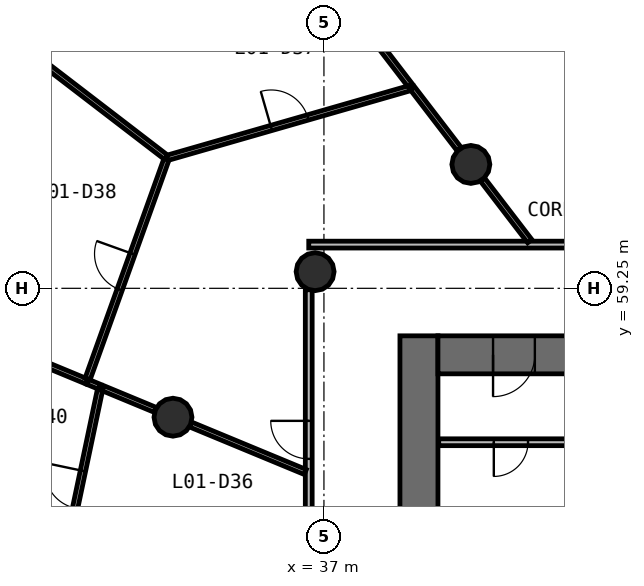
"""IFC4 building model, lengths in metres.
Left out: names, types, materials, properties, quantities, classifications, styles, units other than length and angle.
Written with IfcOpenShell. Run it as: python <this file> out.ifc"""

import sys

from ifc_helpers import new_model, si_unit, direction, frame, frame_2d, origin, origin_2d, place, context, subcontext, project, spatial, rectangle, circle, extrude, source, transform, mapped, element, fill, save


model = new_model("IFC4")
c1 = context("Model", 3, precision=1e-05, world=origin(), true_north=direction((0.0, 1.0)))
c2 = subcontext(c1, "Body", "Model", "MODEL_VIEW")
j1 = project(units=[si_unit("LENGTHUNIT", "METRE"), si_unit("PLANEANGLEUNIT", "RADIAN")], contexts=[c1])
p1 = place(None, origin())
s1 = spatial("IfcSite", under=j1, at=p1, CompositionType="ELEMENT")
p2 = place(p1, origin())
s2 = spatial("IfcBuilding", under=s1, at=p2, CompositionType="ELEMENT")
p3 = place(p2, frame((0.0, 0.0, 5.0)))
s3 = spatial("IfcBuildingStorey", under=s2, at=p3, CompositionType="ELEMENT", Elevation=5.0)
p4 = place(p3, frame((39.5, 58.0, 0.0), z_axis=(0.0, 0.0, 1.0), x_axis=(0.0, -1.0, 0.0)))
e1 = element("IfcWall", 1, at=p4, inside=s3, PredefinedType="SHEAR", context=c2, shape_type="SweptSolid", body=[
    extrude(rectangle(XDim=20.0, YDim=1.0, at=frame_2d((10.0, 0.0))), origin(), (0.0, 0.0, 1.0), 4.4),
])
p5 = place(p4, frame((9.1, 0.0, 0.0)))
e2 = element("IfcOpeningElement", 2, at=p5, cuts=e1, PredefinedType="OPENING", context=c2, shape_type="SweptSolid", body=[
    extrude(rectangle(XDim=1.8, YDim=2.1, at=frame_2d((0.9, 1.05))), frame((0.0, 0.51, 0.0), z_axis=(0.0, -1.0, 0.0), x_axis=(1.0, 0.0, 0.0)), (0.0, 0.0, 1.0), 1.02),
])
p6 = place(p3, frame((64.0, 57.5, 0.0), z_axis=(0.0, 0.0, 1.0), x_axis=(-1.0, 0.0, 0.0)))
e3 = element("IfcWall", 3, at=p6, inside=s3, PredefinedType="SHEAR", context=c2, shape_type="SweptSolid", body=[
    extrude(rectangle(XDim=24.0, YDim=1.0, at=frame_2d((12.0, 0.0))), origin(), (0.0, 0.0, 1.0), 4.4),
])
p7 = place(p6, frame((21.45, 0.0, 0.0)))
e4 = element("IfcOpeningElement", 4, at=p7, cuts=e3, PredefinedType="OPENING", context=c2, shape_type="SweptSolid", body=[
    extrude(rectangle(XDim=1.1, YDim=2.1, at=frame_2d((0.55, 1.05))), frame((0.0, 0.51, 0.0), z_axis=(0.0, -1.0, 0.0), x_axis=(1.0, 0.0, 0.0)), (0.0, 0.0, 1.0), 1.02),
])
p8 = place(p6, frame((1.95, 0.0, 0.0)))
e5 = element("IfcOpeningElement", 5, at=p8, cuts=e3, PredefinedType="OPENING", context=c2, shape_type="SweptSolid", body=[
    extrude(rectangle(XDim=1.1, YDim=2.1, at=frame_2d((0.55, 1.05))), frame((0.0, 0.51, 0.0), z_axis=(0.0, -1.0, 0.0), x_axis=(1.0, 0.0, 0.0)), (0.0, 0.0, 1.0), 1.02),
])
m1 = source(origin(), c2, "Body", "SweptSolid", [
    extrude(circle(Radius=0.5, at=origin_2d()), origin(), (0.0, 0.0, 1.0), 4.4),
])
for number, where, z_axis, x_axis in (
    (6, (40.866, 62.51, 0.0), (0.0, 0.0, 1.0), (1.0, 0.0, 0.0)),
    (7, (36.768, 59.688, 0.0), (0.0, 0.0, 1.0), (1.0, 0.0, 0.0)),
    (8, (33.028, 55.859, 0.0), (0.0, 0.0, 1.0), (1.0, 0.0, 0.0)),
):
    element("IfcColumn", number, at=place(p3, frame(where, z_axis=z_axis, x_axis=x_axis)), inside=s3, PredefinedType="COLUMN", context=c2, shape_type="MappedRepresentation", body=[
        mapped(m1, transform((0.0, 0.0, 0.0), scale=1.0)),
    ])
p9 = place(p3, frame((36.6, 60.4, 0.0), z_axis=(0.0, 0.0, 1.0), x_axis=(1.0, 0.0, 0.0)))
e9 = element("IfcWall", 9, at=p9, inside=s3, PredefinedType="PARTITIONING", context=c2, shape_type="SweptSolid", body=[
    extrude(rectangle(XDim=30.8, YDim=0.18, at=frame_2d((15.4, 0.0))), origin(), (0.0, 0.0, 1.0), 3.25),
])
p10 = place(p9, frame((22.25, 0.0, 0.0)))
e10 = element("IfcOpeningElement", 10, at=p10, cuts=e9, PredefinedType="OPENING", context=c2, shape_type="SweptSolid", body=[
    extrude(rectangle(XDim=0.9, YDim=2.1, at=frame_2d((0.45, 1.05))), frame((0.0, 0.1, 0.0), z_axis=(0.0, -1.0, 0.0), x_axis=(1.0, 0.0, 0.0)), (0.0, 0.0, 1.0), 0.2),
])
p11 = place(p9, frame((19.65, 0.0, 0.0)))
e11 = element("IfcOpeningElement", 11, at=p11, cuts=e9, PredefinedType="OPENING", context=c2, shape_type="SweptSolid", body=[
    extrude(rectangle(XDim=0.9, YDim=2.1, at=frame_2d((0.45, 1.05))), frame((0.0, 0.1, 0.0), z_axis=(0.0, -1.0, 0.0), x_axis=(1.0, 0.0, 0.0)), (0.0, 0.0, 1.0), 0.2),
])
p12 = place(p9, frame((17.25, 0.0, 0.0)))
e12 = element("IfcOpeningElement", 12, at=p12, cuts=e9, PredefinedType="OPENING", context=c2, shape_type="SweptSolid", body=[
    extrude(rectangle(XDim=0.9, YDim=2.1, at=frame_2d((0.45, 1.05))), frame((0.0, 0.1, 0.0), z_axis=(0.0, -1.0, 0.0), x_axis=(1.0, 0.0, 0.0)), (0.0, 0.0, 1.0), 0.2),
])
p13 = place(p9, frame((14.95, 0.0, 0.0)))
e13 = element("IfcOpeningElement", 13, at=p13, cuts=e9, PredefinedType="OPENING", context=c2, shape_type="SweptSolid", body=[
    extrude(rectangle(XDim=1.0, YDim=2.1, at=frame_2d((0.5, 1.05))), frame((0.0, 0.1, 0.0), z_axis=(0.0, -1.0, 0.0), x_axis=(1.0, 0.0, 0.0)), (0.0, 0.0, 1.0), 0.2),
])
p14 = place(p3, frame((36.6, 35.63, 0.0), z_axis=(0.0, 0.0, 1.0), x_axis=(0.0, 1.0, 0.0)))
e14 = element("IfcWall", 14, at=p14, inside=s3, PredefinedType="PARTITIONING", context=c2, shape_type="SweptSolid", body=[
    extrude(rectangle(XDim=23.583, YDim=0.18, at=frame_2d((11.791, 0.0))), origin(), (0.0, 0.0, 1.0), 3.25),
])
p15 = place(p14, frame((19.133, 0.0, 0.0)))
e15 = element("IfcOpeningElement", 15, at=p15, cuts=e14, PredefinedType="OPENING", context=c2, shape_type="SweptSolid", body=[
    extrude(rectangle(XDim=1.0, YDim=2.1, at=frame_2d((0.5, 1.05))), frame((0.0, 0.1, 0.0), z_axis=(0.0, -1.0, 0.0), x_axis=(1.0, 0.0, 0.0)), (0.0, 0.0, 1.0), 0.2),
])
p16 = place(p14, frame((11.333, 0.0, 0.0)))
e16 = element("IfcOpeningElement", 16, at=p16, cuts=e14, PredefinedType="OPENING", context=c2, shape_type="SweptSolid", body=[
    extrude(rectangle(XDim=1.0, YDim=2.1, at=frame_2d((0.5, 1.05))), frame((0.0, 0.1, 0.0), z_axis=(0.0, -1.0, 0.0), x_axis=(1.0, 0.0, 0.0)), (0.0, 0.0, 1.0), 0.2),
])
p17 = place(p14, frame((4.532, 0.0, 0.0)))
e17 = element("IfcOpeningElement", 17, at=p17, cuts=e14, PredefinedType="OPENING", context=c2, shape_type="SweptSolid", body=[
    extrude(rectangle(XDim=1.0, YDim=2.1, at=frame_2d((0.5, 1.05))), frame((0.0, 0.1, 0.0), z_axis=(0.0, -1.0, 0.0), x_axis=(1.0, 0.0, 0.0)), (0.0, 0.0, 1.0), 0.2),
])
p18 = place(p3, frame((43.77, 55.2, 0.0), z_axis=(0.0, 0.0, 1.0), x_axis=(-1.0, 0.0, 0.0)))
e18 = element("IfcWall", 18, at=p18, inside=s3, PredefinedType="PARTITIONING", context=c2, shape_type="SweptSolid", body=[
    extrude(rectangle(XDim=3.75, YDim=0.18, at=frame_2d((1.875, 0.0))), origin(), (0.0, 0.0, 1.0), 4.05),
])
p19 = place(p18, frame((1.4, 0.0, 0.0)))
e19 = element("IfcOpeningElement", 19, at=p19, cuts=e18, PredefinedType="OPENING", context=c2, shape_type="SweptSolid", body=[
    extrude(rectangle(XDim=0.9, YDim=2.1, at=frame_2d((0.45, 1.05))), frame((0.0, 0.1, 0.0), z_axis=(0.0, -1.0, 0.0), x_axis=(1.0, 0.0, 0.0)), (0.0, 0.0, 1.0), 0.2),
])
p20 = place(p3, frame((30.757, 56.799, 0.0), z_axis=(0.0, 0.0, 1.0), x_axis=(-0.923877426418, 0.382688516884, 0.0)))
e20 = element("IfcWall", 20, at=p20, inside=s3, PredefinedType="PARTITIONING", context=c2, shape_type="SweptSolid", body=[
    extrude(rectangle(XDim=8.389, YDim=0.14, at=frame_2d((4.194, 0.0))), origin(), (0.0, 0.0, 1.0), 3.25),
])
p21 = place(p3, frame((32.869, 62.68, 0.0), z_axis=(0.0, 0.0, 1.0), x_axis=(0.96106930393, 0.27630742488, 0.0)))
e21 = element("IfcWall", 21, at=p21, inside=s3, PredefinedType="PARTITIONING", context=c2, shape_type="SweptSolid", body=[
    extrude(rectangle(XDim=6.706, YDim=0.14, at=frame_2d((3.353, 0.0))), origin(), (0.0, 0.0, 1.0), 3.25),
])
p22 = place(p21, frame((2.856, 0.0, 0.0)))
e22 = element("IfcOpeningElement", 22, at=p22, cuts=e21, PredefinedType="OPENING", context=c2, shape_type="SweptSolid", body=[
    extrude(rectangle(XDim=1.0, YDim=2.1, at=frame_2d((0.5, 1.05))), frame((0.0, 0.08, 0.0), z_axis=(0.0, -1.0, 0.0), x_axis=(1.0, 0.0, 0.0)), (0.0, 0.0, 1.0), 0.16),
])
p23 = place(p3, frame((30.781, 56.865, 0.0), z_axis=(0.0, 0.0, 1.0), x_axis=(0.338038822493, 0.941132166323, 0.0)))
e23 = element("IfcWall", 23, at=p23, inside=s3, PredefinedType="PARTITIONING", context=c2, shape_type="SweptSolid", body=[
    extrude(rectangle(XDim=6.148, YDim=0.14, at=frame_2d((3.074, 0.0))), origin(), (0.0, 0.0, 1.0), 3.25),
])
p24 = place(p23, frame((2.498, 0.0, 0.0)))
e24 = element("IfcOpeningElement", 24, at=p24, cuts=e23, PredefinedType="OPENING", context=c2, shape_type="SweptSolid", body=[
    extrude(rectangle(XDim=1.0, YDim=2.1, at=frame_2d((0.5, 1.05))), frame((0.0, 0.08, 0.0), z_axis=(0.0, -1.0, 0.0), x_axis=(1.0, 0.0, 0.0)), (0.0, 0.0, 1.0), 0.16),
])
p25 = place(p3, frame((30.01, 51.366, 0.0), z_axis=(0.0, 0.0, 1.0), x_axis=(0.206040116916, 0.978543545388, 0.0)))
e25 = element("IfcWall", 25, at=p25, inside=s3, PredefinedType="PARTITIONING", context=c2, shape_type="SweptSolid", body=[
    extrude(rectangle(XDim=5.397, YDim=0.14, at=frame_2d((2.699, 0.0))), origin(), (0.0, 0.0, 1.0), 3.25),
])
p26 = place(p25, frame((2.147, 0.0, 0.0)))
e26 = element("IfcOpeningElement", 26, at=p26, cuts=e25, PredefinedType="OPENING", context=c2, shape_type="SweptSolid", body=[
    extrude(rectangle(XDim=1.0, YDim=2.1, at=frame_2d((0.5, 1.05))), frame((0.0, 0.08, 0.0), z_axis=(0.0, -1.0, 0.0), x_axis=(1.0, 0.0, 0.0)), (0.0, 0.0, 1.0), 0.16),
])
p27 = place(p3, frame((32.845, 62.698, 0.0), z_axis=(0.0, 0.0, 1.0), x_axis=(-0.793372133446, 0.60873693651, 0.0)))
e27 = element("IfcWall", 27, at=p27, inside=s3, PredefinedType="PARTITIONING", context=c2, shape_type="SweptSolid", body=[
    extrude(rectangle(XDim=5.152, YDim=0.14, at=frame_2d((2.576, 0.0))), origin(), (0.0, 0.0, 1.0), 3.25),
])
p28 = place(p3, frame((36.51, 54.416, 0.0), z_axis=(0.0, 0.0, 1.0), x_axis=(-0.923911109142, 0.382607190737, 0.0)))
e28 = element("IfcWall", 28, at=p28, inside=s3, PredefinedType="PARTITIONING", context=c2, shape_type="SweptSolid", body=[
    extrude(rectangle(XDim=3.264, YDim=0.14, at=frame_2d((1.632, 0.0))), origin(), (0.0, 0.0, 1.0), 3.25),
])
p29 = place(p3, frame((39.268, 64.592, 0.0), z_axis=(0.0, 0.0, 1.0), x_axis=(-0.608775029145, 0.793342904355, 0.0)))
e29 = element("IfcWall", 29, at=p29, inside=s3, PredefinedType="PARTITIONING", context=c2, shape_type="SweptSolid", body=[
    extrude(rectangle(XDim=3.103, YDim=0.14, at=frame_2d((1.552, 0.0))), origin(), (0.0, 0.0, 1.0), 3.25),
])
p30 = place(p3, frame((42.416, 60.49, 0.0), z_axis=(0.0, 0.0, 1.0), x_axis=(-0.608727763541, 0.793379171578, 0.0)))
e30 = element("IfcWall", 30, at=p30, inside=s3, PredefinedType="PARTITIONING", context=c2, shape_type="SweptSolid", body=[
    extrude(rectangle(XDim=2.042, YDim=0.14, at=frame_2d((1.021, 0.0))), origin(), (0.0, 0.0, 1.0), 3.25),
])
p31 = place(p3, frame((40.559, 62.91, 0.0), z_axis=(0.0, 0.0, 1.0), x_axis=(-0.608726567924, 0.793380088926, 0.0)))
e31 = element("IfcWall", 31, at=p31, inside=s3, PredefinedType="PARTITIONING", context=c2, shape_type="SweptSolid", body=[
    extrude(rectangle(XDim=2.015, YDim=0.14, at=frame_2d((1.007, 0.0))), origin(), (0.0, 0.0, 1.0), 3.25),
])
p32 = place(p3, frame((32.561, 56.052, 0.0), z_axis=(0.0, 0.0, 1.0), x_axis=(-0.923910723686, 0.382608121526, 0.0)))
e32 = element("IfcWall", 32, at=p32, inside=s3, PredefinedType="PARTITIONING", context=c2, shape_type="SweptSolid", body=[
    extrude(rectangle(XDim=1.486, YDim=0.14, at=frame_2d((0.743, 0.0))), origin(), (0.0, 0.0, 1.0), 3.25),
])
p33 = place(p3, frame((31.094, 56.659, 0.0), z_axis=(0.0, 0.0, 1.0), x_axis=(-0.92404344338, 0.382287476576, 0.0)))
e33 = element("IfcWall", 33, at=p33, inside=s3, PredefinedType="PARTITIONING", context=c2, shape_type="SweptSolid", body=[
    extrude(rectangle(XDim=0.335, YDim=0.14, at=frame_2d((0.167, 0.0))), origin(), (0.0, 0.0, 1.0), 3.25),
])
m2 = source(origin(), c2, "Body", "SweptSolid", [
    extrude(rectangle(XDim=1.1, YDim=2.1, at=frame_2d((0.55, 1.05))), frame((0.0, 0.025, 0.0), z_axis=(0.0, -1.0, 0.0), x_axis=(1.0, 0.0, 0.0)), (0.0, 0.0, 1.0), 0.05),
])
p34 = place(p7, origin())
e34 = element("IfcDoor", 34, at=p34, inside=s3, OperationType="SINGLE_SWING_RIGHT", PredefinedType="DOOR", context=c2, shape_type="MappedRepresentation", body=[
    mapped(m2, transform((0.0, 0.0, 0.0), scale=1.0)),
])
fill(e4, e34)
m3 = source(origin(), c2, "Body", "SweptSolid", [
    extrude(rectangle(XDim=1.0, YDim=2.1, at=frame_2d((0.5, 1.05))), frame((0.0, 0.025, 0.0), z_axis=(0.0, -1.0, 0.0), x_axis=(1.0, 0.0, 0.0)), (0.0, 0.0, 1.0), 0.05),
])
p35 = place(p15, origin())
e35 = element("IfcDoor", 35, at=p35, inside=s3, OperationType="SINGLE_SWING_RIGHT", PredefinedType="DOOR", context=c2, shape_type="MappedRepresentation", body=[
    mapped(m3, transform((0.0, 0.0, 0.0), scale=1.0)),
])
fill(e15, e35)
p36 = place(p22, origin())
e36 = element("IfcDoor", 36, at=p36, inside=s3, OperationType="SINGLE_SWING_LEFT", PredefinedType="DOOR", context=c2, shape_type="MappedRepresentation", body=[
    mapped(m3, transform((0.0, 0.0, 0.0), scale=1.0)),
])
fill(e22, e36)
p37 = place(p24, origin())
e37 = element("IfcDoor", 37, at=p37, inside=s3, OperationType="SINGLE_SWING_RIGHT", PredefinedType="DOOR", context=c2, shape_type="MappedRepresentation", body=[
    mapped(m3, transform((0.0, 0.0, 0.0), scale=1.0)),
])
fill(e24, e37)
p38 = place(p26, origin())
e38 = element("IfcDoor", 38, at=p38, inside=s3, OperationType="SINGLE_SWING_RIGHT", PredefinedType="DOOR", context=c2, shape_type="MappedRepresentation", body=[
    mapped(m3, transform((0.0, 0.0, 0.0), scale=1.0)),
])
fill(e26, e38)
m4 = source(origin(), c2, "Body", "SweptSolid", [
    extrude(rectangle(XDim=0.9, YDim=2.1, at=frame_2d((0.45, 1.05))), frame((0.0, 0.025, 0.0), z_axis=(0.0, -1.0, 0.0), x_axis=(1.0, 0.0, 0.0)), (0.0, 0.0, 1.0), 0.05),
])
p39 = place(p19, origin())
e39 = element("IfcDoor", 39, at=p39, inside=s3, OperationType="SINGLE_SWING_RIGHT", PredefinedType="DOOR", context=c2, shape_type="MappedRepresentation", body=[
    mapped(m4, transform((0.0, 0.0, 0.0), scale=1.0)),
])
fill(e19, e39)
save(model, sys.argv[1])
